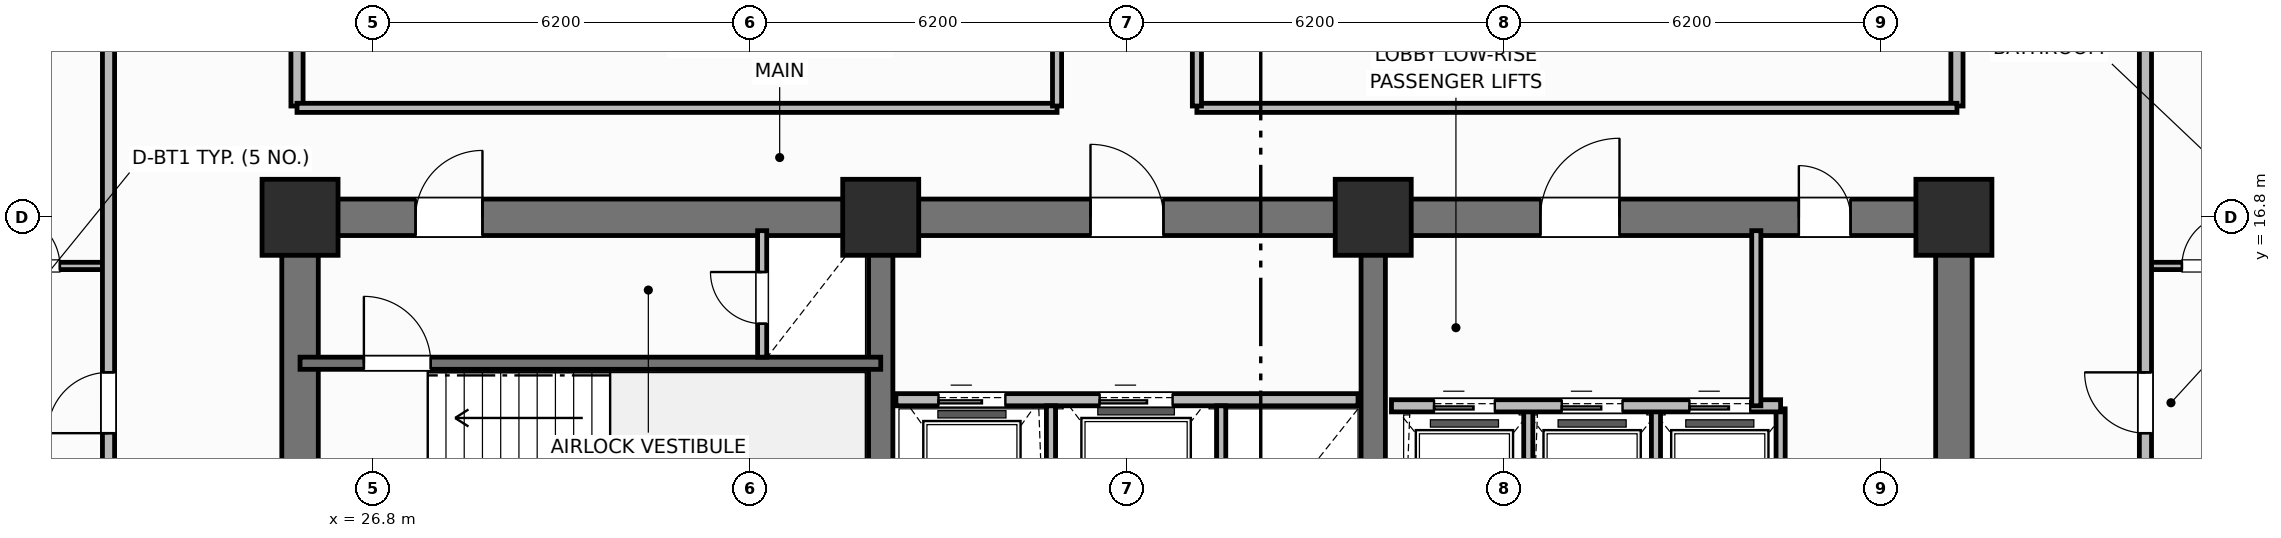
"""IFC4 building model, lengths in metres.
Left out: names, types, materials, properties, quantities, classifications, styles, units other than length and angle.
Written with IfcOpenShell. Run it as: python <this file> out.ifc"""

import sys

from ifc_helpers import new_model, si_unit, direction, frame, frame_2d, origin, origin_2d, place, context, subcontext, project, spatial, rectangle, extrude, element, fill, save


model = new_model("IFC4")
c1 = context("Model", 3, precision=1e-05, world=origin(), true_north=direction((0.0, 1.0)))
c2 = subcontext(c1, "Body", "Model", "MODEL_VIEW")
j1 = project(units=[si_unit("LENGTHUNIT", "METRE"), si_unit("PLANEANGLEUNIT", "RADIAN")], contexts=[c1])
p1 = place(None, origin())
s1 = spatial("IfcSite", under=j1, at=p1, CompositionType="ELEMENT")
p2 = place(p1, origin())
s2 = spatial("IfcBuilding", under=s1, at=p2, CompositionType="ELEMENT")
p3 = place(p2, frame((0.0, 0.0, 28.8)))
s3 = spatial("IfcBuildingStorey", under=s2, at=p3, CompositionType="ELEMENT", Elevation=28.8)
for number, where, z_axis, x_axis in (
    (1, (25.6, 10.9, 0.0), (0.0, 0.0, 1.0), (0.0, 1.0, 0.0)),
    (2, (52.8, 10.9, 0.0), (0.0, 0.0, 1.0), (0.0, 1.0, 0.0)),
):
    element("IfcWall", number, at=place(p3, frame(where, z_axis=z_axis, x_axis=x_axis)), inside=s3, PredefinedType="SHEAR", context=c2, shape_type="SweptSolid", body=[
        extrude(rectangle(XDim=5.6, YDim=0.6, at=frame_2d((2.8, 0.0))), origin(), (0.0, 0.0, 1.0), 3.7),
    ])
p4 = place(p3, frame((25.6, 16.8, 0.0), z_axis=(0.0, 0.0, 1.0), x_axis=(1.0, 0.0, 0.0)))
e3 = element("IfcWall", 3, at=p4, inside=s3, PredefinedType="SHEAR", context=c2, shape_type="SweptSolid", body=[
    extrude(rectangle(XDim=27.2, YDim=0.6, at=frame_2d((13.6, 0.0))), origin(), (0.0, 0.0, 1.0), 3.7),
])
p5 = place(p4, frame((1.9, 0.0, 0.0)))
e4 = element("IfcOpeningElement", 4, at=p5, cuts=e3, PredefinedType="OPENING", context=c2, shape_type="SweptSolid", body=[
    extrude(rectangle(XDim=1.1, YDim=2.15, at=frame_2d((0.55, 1.075))), frame((0.0, 0.31, 0.0), z_axis=(0.0, -1.0, 0.0), x_axis=(1.0, 0.0, 0.0)), (0.0, 0.0, 1.0), 0.62),
])
p6 = place(p4, frame((13.0, 0.0, 0.0)))
e5 = element("IfcOpeningElement", 5, at=p6, cuts=e3, PredefinedType="OPENING", context=c2, shape_type="SweptSolid", body=[
    extrude(rectangle(XDim=1.2, YDim=2.15, at=frame_2d((0.6, 1.075))), frame((0.0, 0.31, 0.0), z_axis=(0.0, -1.0, 0.0), x_axis=(1.0, 0.0, 0.0)), (0.0, 0.0, 1.0), 0.62),
])
p7 = place(p4, frame((20.4, 0.0, 0.0)))
e6 = element("IfcOpeningElement", 6, at=p7, cuts=e3, PredefinedType="OPENING", context=c2, shape_type="SweptSolid", body=[
    extrude(rectangle(XDim=1.3, YDim=2.2, at=frame_2d((0.65, 1.1))), frame((0.0, 0.31, 0.0), z_axis=(0.0, -1.0, 0.0), x_axis=(1.0, 0.0, 0.0)), (0.0, 0.0, 1.0), 0.62),
])
p8 = place(p4, frame((24.65, 0.0, 0.0)))
e7 = element("IfcOpeningElement", 7, at=p8, cuts=e3, PredefinedType="OPENING", context=c2, shape_type="SweptSolid", body=[
    extrude(rectangle(XDim=0.85, YDim=2.1, at=frame_2d((0.425, 1.05))), frame((0.0, 0.31, 0.0), z_axis=(0.0, -1.0, 0.0), x_axis=(1.0, 0.0, 0.0)), (0.0, 0.0, 1.0), 0.62),
])
for number, where, z_axis, x_axis in (
    (8, (35.15, 10.9, 0.0), (0.0, 0.0, 1.0), (0.0, 1.0, 0.0)),
    (9, (43.25, 10.9, 0.0), (0.0, 0.0, 1.0), (0.0, 1.0, 0.0)),
):
    element("IfcWall", number, at=place(p3, frame(where, z_axis=z_axis, x_axis=x_axis)), inside=s3, PredefinedType="SHEAR", context=c2, shape_type="SweptSolid", body=[
        extrude(rectangle(XDim=5.6, YDim=0.4, at=frame_2d((2.8, 0.0))), origin(), (0.0, 0.0, 1.0), 3.7),
    ])
for number, where, z_axis, x_axis in (
    (10, (25.6, 16.8, 0.0), (0.0, 0.0, 1.0), (1.0, 0.0, 0.0)),
    (11, (35.15, 16.8, 0.0), (0.0, 0.0, 1.0), (1.0, 0.0, 0.0)),
    (12, (43.25, 16.8, 0.0), (0.0, 0.0, 1.0), (1.0, 0.0, 0.0)),
    (13, (52.8, 16.8, 0.0), (0.0, 0.0, 1.0), (1.0, 0.0, 0.0)),
):
    element("IfcColumn", number, at=place(p3, frame(where, z_axis=z_axis, x_axis=x_axis)), inside=s3, PredefinedType="COLUMN", context=c2, shape_type="SweptSolid", body=[
        extrude(rectangle(XDim=1.25, YDim=1.25, at=origin_2d()), origin(), (0.0, 0.0, 1.0), 3.7),
    ])
p9 = place(p3, frame((25.6, 14.4, 0.0), z_axis=(0.0, 0.0, 1.0), x_axis=(1.0, 0.0, 0.0)))
e14 = element("IfcWall", 14, at=p9, inside=s3, PredefinedType="SHEAR", context=c2, shape_type="SweptSolid", body=[
    extrude(rectangle(XDim=9.55, YDim=0.2, at=frame_2d((4.775, 0.0))), origin(), (0.0, 0.0, 1.0), 3.7),
])
p10 = place(p9, frame((1.05, 0.0, 0.0)))
e15 = element("IfcOpeningElement", 15, at=p10, cuts=e14, PredefinedType="OPENING", context=c2, shape_type="SweptSolid", body=[
    extrude(rectangle(XDim=1.1, YDim=2.15, at=frame_2d((0.55, 1.075))), frame((0.0, 0.11, 0.0), z_axis=(0.0, -1.0, 0.0), x_axis=(1.0, 0.0, 0.0)), (0.0, 0.0, 1.0), 0.22),
])
p11 = place(p3, frame((33.2, 14.5, 0.0), z_axis=(0.0, 0.0, 1.0), x_axis=(0.0, 1.0, 0.0)))
e16 = element("IfcWall", 16, at=p11, inside=s3, PredefinedType="PARTITIONING", context=c2, shape_type="SweptSolid", body=[
    extrude(rectangle(XDim=2.08, YDim=0.15, at=frame_2d((1.04, 0.0))), origin(), (0.0, 0.0, 1.0), 2.53),
])
p12 = place(p11, frame((0.55, 0.0, 0.0)))
e17 = element("IfcOpeningElement", 17, at=p12, cuts=e16, PredefinedType="OPENING", context=c2, shape_type="SweptSolid", body=[
    extrude(rectangle(XDim=0.85, YDim=2.05, at=frame_2d((0.425, 1.025))), frame((0.0, 0.085, 0.0), z_axis=(0.0, -1.0, 0.0), x_axis=(1.0, 0.0, 0.0)), (0.0, 0.0, 1.0), 0.17),
])
p13 = place(p3, frame((35.4, 13.8, 0.0), z_axis=(0.0, 0.0, 1.0), x_axis=(1.0, 0.0, 0.0)))
e18 = element("IfcWall", 18, at=p13, inside=s3, PredefinedType="PARTITIONING", context=c2, shape_type="SweptSolid", body=[
    extrude(rectangle(XDim=7.6, YDim=0.2, at=frame_2d((3.8, 0.0))), origin(), (0.0, 0.0, 1.0), 2.3),
])
p14 = place(p13, frame((0.7, 0.0, 0.0)))
e19 = element("IfcOpeningElement", 19, at=p14, cuts=e18, PredefinedType="OPENING", context=c2, shape_type="SweptSolid", body=[
    extrude(rectangle(XDim=1.1, YDim=2.15, at=frame_2d((0.55, 1.075))), frame((0.0, 0.11, 0.0), z_axis=(0.0, -1.0, 0.0), x_axis=(1.0, 0.0, 0.0)), (0.0, 0.0, 1.0), 0.22),
])
p15 = place(p13, frame((3.35, 0.0, 0.0)))
e20 = element("IfcOpeningElement", 20, at=p15, cuts=e18, PredefinedType="OPENING", context=c2, shape_type="SweptSolid", body=[
    extrude(rectangle(XDim=1.2, YDim=2.15, at=frame_2d((0.6, 1.075))), frame((0.0, 0.11, 0.0), z_axis=(0.0, -1.0, 0.0), x_axis=(1.0, 0.0, 0.0)), (0.0, 0.0, 1.0), 0.22),
])
for number, where, z_axis, x_axis in (
    (21, (37.95, 10.95, 0.0), (0.0, 0.0, 1.0), (0.0, 1.0, 0.0)),
    (22, (40.75, 10.95, 0.0), (0.0, 0.0, 1.0), (0.0, 1.0, 0.0)),
):
    element("IfcWall", number, at=place(p3, frame(where, z_axis=z_axis, x_axis=x_axis)), inside=s3, PredefinedType="PARTITIONING", context=c2, shape_type="SweptSolid", body=[
        extrude(rectangle(XDim=2.75, YDim=0.15, at=frame_2d((1.375, 0.0))), origin(), (0.0, 0.0, 1.0), 2.53),
    ])
for number, where, z_axis, x_axis in (
    (23, (45.8, 10.95, 0.0), (0.0, 0.0, 1.0), (0.0, 1.0, 0.0)),
    (24, (47.9, 10.95, 0.0), (0.0, 0.0, 1.0), (0.0, 1.0, 0.0)),
    (25, (49.95, 10.95, 0.0), (0.0, 0.0, 1.0), (0.0, 1.0, 0.0)),
):
    element("IfcWall", number, at=place(p3, frame(where, z_axis=z_axis, x_axis=x_axis)), inside=s3, PredefinedType="PARTITIONING", context=c2, shape_type="SweptSolid", body=[
        extrude(rectangle(XDim=2.7, YDim=0.15, at=frame_2d((1.35, 0.0))), origin(), (0.0, 0.0, 1.0), 2.53),
    ])
p16 = place(p3, frame((43.55, 13.7, 0.0), z_axis=(0.0, 0.0, 1.0), x_axis=(1.0, 0.0, 0.0)))
e26 = element("IfcWall", 26, at=p16, inside=s3, PredefinedType="PARTITIONING", context=c2, shape_type="SweptSolid", body=[
    extrude(rectangle(XDim=6.4, YDim=0.2, at=frame_2d((3.2, 0.0))), origin(), (0.0, 0.0, 1.0), 2.53),
])
p17 = place(p16, frame((0.7, 0.0, 0.0)))
e27 = element("IfcOpeningElement", 27, at=p17, cuts=e26, PredefinedType="OPENING", context=c2, shape_type="SweptSolid", body=[
    extrude(rectangle(XDim=1.0, YDim=2.15, at=frame_2d((0.5, 1.075))), frame((0.0, 0.11, 0.0), z_axis=(0.0, -1.0, 0.0), x_axis=(1.0, 0.0, 0.0)), (0.0, 0.0, 1.0), 0.22),
])
p18 = place(p16, frame((2.8, 0.0, 0.0)))
e28 = element("IfcOpeningElement", 28, at=p18, cuts=e26, PredefinedType="OPENING", context=c2, shape_type="SweptSolid", body=[
    extrude(rectangle(XDim=1.0, YDim=2.15, at=frame_2d((0.5, 1.075))), frame((0.0, 0.11, 0.0), z_axis=(0.0, -1.0, 0.0), x_axis=(1.0, 0.0, 0.0)), (0.0, 0.0, 1.0), 0.22),
])
p19 = place(p16, frame((4.9, 0.0, 0.0)))
e29 = element("IfcOpeningElement", 29, at=p19, cuts=e26, PredefinedType="OPENING", context=c2, shape_type="SweptSolid", body=[
    extrude(rectangle(XDim=1.0, YDim=2.15, at=frame_2d((0.5, 1.075))), frame((0.0, 0.11, 0.0), z_axis=(0.0, -1.0, 0.0), x_axis=(1.0, 0.0, 0.0)), (0.0, 0.0, 1.0), 0.22),
])
p20 = place(p3, frame((49.55, 13.7, 0.0), z_axis=(0.0, 0.0, 1.0), x_axis=(0.0, 1.0, 0.0)))
e30 = element("IfcWall", 30, at=p20, inside=s3, PredefinedType="PARTITIONING", context=c2, shape_type="SweptSolid", body=[
    extrude(rectangle(XDim=2.88, YDim=0.15, at=frame_2d((1.44, 0.0))), origin(), (0.0, 0.0, 1.0), 2.53),
])
for number, where, z_axis, x_axis in (
    (31, (25.55, 18.63, 0.0), (0.0, 0.0, 1.0), (0.0, 1.0, 0.0)),
    (32, (52.85, 18.63, 0.0), (0.0, 0.0, 1.0), (0.0, 1.0, 0.0)),
):
    element("IfcWall", number, at=place(p3, frame(where, z_axis=z_axis, x_axis=x_axis)), inside=s3, PredefinedType="PARTITIONING", context=c2, shape_type="SweptSolid", body=[
        extrude(rectangle(XDim=19.14, YDim=0.2, at=frame_2d((9.57, 0.0))), origin(), (0.0, 0.0, 1.0), 2.53),
    ])
for number, where, z_axis, x_axis in (
    (33, (25.55, 18.6, 0.0), (0.0, 0.0, 1.0), (1.0, 0.0, 0.0)),
    (34, (40.35, 18.6, 0.0), (0.0, 0.0, 1.0), (1.0, 0.0, 0.0)),
):
    element("IfcWall", number, at=place(p3, frame(where, z_axis=z_axis, x_axis=x_axis)), inside=s3, PredefinedType="PARTITIONING", context=c2, shape_type="SweptSolid", body=[
        extrude(rectangle(XDim=12.5, YDim=0.15, at=frame_2d((6.25, 0.0))), origin(), (0.0, 0.0, 1.0), 2.53),
    ])
p21 = place(p3, frame((38.05, 18.63, 0.0), z_axis=(0.0, 0.0, 1.0), x_axis=(0.0, 1.0, 0.0)))
e35 = element("IfcWall", 35, at=p21, inside=s3, PredefinedType="PARTITIONING", context=c2, shape_type="SweptSolid", body=[
    extrude(rectangle(XDim=19.14, YDim=0.15, at=frame_2d((9.57, 0.0))), origin(), (0.0, 0.0, 1.0), 2.53),
])
p22 = place(p21, frame((5.5, 0.0, 0.0)))
e36 = element("IfcOpeningElement", 36, at=p22, cuts=e35, PredefinedType="OPENING", context=c2, shape_type="SweptSolid", body=[
    extrude(rectangle(XDim=1.0, YDim=2.15, at=frame_2d((0.5, 1.075))), frame((0.0, 0.085, 0.0), z_axis=(0.0, -1.0, 0.0), x_axis=(1.0, 0.0, 0.0)), (0.0, 0.0, 1.0), 0.17),
])
p23 = place(p3, frame((40.35, 18.63, 0.0), z_axis=(0.0, 0.0, 1.0), x_axis=(0.0, 1.0, 0.0)))
e37 = element("IfcWall", 37, at=p23, inside=s3, PredefinedType="PARTITIONING", context=c2, shape_type="SweptSolid", body=[
    extrude(rectangle(XDim=19.14, YDim=0.15, at=frame_2d((9.57, 0.0))), origin(), (0.0, 0.0, 1.0), 2.53),
])
p24 = place(p23, frame((5.5, 0.0, 0.0)))
e38 = element("IfcOpeningElement", 38, at=p24, cuts=e37, PredefinedType="OPENING", context=c2, shape_type="SweptSolid", body=[
    extrude(rectangle(XDim=1.0, YDim=2.15, at=frame_2d((0.5, 1.075))), frame((0.0, 0.085, 0.0), z_axis=(0.0, -1.0, 0.0), x_axis=(1.0, 0.0, 0.0)), (0.0, 0.0, 1.0), 0.17),
])
p25 = place(p3, frame((20.2, 16.0, 0.0), z_axis=(0.0, 0.0, 1.0), x_axis=(1.0, 0.0, 0.0)))
e39 = element("IfcWall", 39, at=p25, inside=s3, PredefinedType="PARTITIONING", context=c2, shape_type="SweptSolid", body=[
    extrude(rectangle(XDim=2.25, YDim=0.12, at=frame_2d((1.125, 0.0))), origin(), (0.0, 0.0, 1.0), 2.53),
])
p26 = place(p25, frame((0.6, 0.0, 0.0)))
e40 = element("IfcOpeningElement", 40, at=p26, cuts=e39, PredefinedType="OPENING", context=c2, shape_type="SweptSolid", body=[
    extrude(rectangle(XDim=0.85, YDim=2.1, at=frame_2d((0.425, 1.05))), frame((0.0, 0.07, 0.0), z_axis=(0.0, -1.0, 0.0), x_axis=(1.0, 0.0, 0.0)), (0.0, 0.0, 1.0), 0.14),
])
p27 = place(p3, frame((22.45, 10.6, 0.0), z_axis=(0.0, 0.0, 1.0), x_axis=(0.0, 1.0, 0.0)))
e41 = element("IfcWall", 41, at=p27, inside=s3, PredefinedType="PARTITIONING", context=c2, shape_type="SweptSolid", body=[
    extrude(rectangle(XDim=35.2, YDim=0.2, at=frame_2d((17.6, 0.0))), origin(), (0.0, 0.0, 1.0), 2.53),
])
p28 = place(p27, frame((2.65, 0.0, 0.0)))
e42 = element("IfcOpeningElement", 42, at=p28, cuts=e41, PredefinedType="OPENING", context=c2, shape_type="SweptSolid", body=[
    extrude(rectangle(XDim=1.0, YDim=2.15, at=frame_2d((0.5, 1.075))), frame((0.0, 0.11, 0.0), z_axis=(0.0, -1.0, 0.0), x_axis=(1.0, 0.0, 0.0)), (0.0, 0.0, 1.0), 0.22),
])
p29 = place(p27, frame((19.95, 0.0, 0.0)))
e43 = element("IfcOpeningElement", 43, at=p29, cuts=e41, PredefinedType="OPENING", context=c2, shape_type="SweptSolid", body=[
    extrude(rectangle(XDim=1.0, YDim=2.15, at=frame_2d((0.5, 1.075))), frame((0.0, 0.11, 0.0), z_axis=(0.0, -1.0, 0.0), x_axis=(1.0, 0.0, 0.0)), (0.0, 0.0, 1.0), 0.22),
])
p30 = place(p3, frame((55.95, 16.0, 0.0), z_axis=(0.0, 0.0, 1.0), x_axis=(1.0, 0.0, 0.0)))
e44 = element("IfcWall", 44, at=p30, inside=s3, PredefinedType="PARTITIONING", context=c2, shape_type="SweptSolid", body=[
    extrude(rectangle(XDim=2.25, YDim=0.12, at=frame_2d((1.125, 0.0))), origin(), (0.0, 0.0, 1.0), 2.53),
])
p31 = place(p30, frame((0.6, 0.0, 0.0)))
e45 = element("IfcOpeningElement", 45, at=p31, cuts=e44, PredefinedType="OPENING", context=c2, shape_type="SweptSolid", body=[
    extrude(rectangle(XDim=0.85, YDim=2.1, at=frame_2d((0.425, 1.05))), frame((0.0, 0.07, 0.0), z_axis=(0.0, -1.0, 0.0), x_axis=(1.0, 0.0, 0.0)), (0.0, 0.0, 1.0), 0.14),
])
p32 = place(p3, frame((55.95, 10.6, 0.0), z_axis=(0.0, 0.0, 1.0), x_axis=(0.0, 1.0, 0.0)))
e46 = element("IfcWall", 46, at=p32, inside=s3, PredefinedType="PARTITIONING", context=c2, shape_type="SweptSolid", body=[
    extrude(rectangle(XDim=35.2, YDim=0.2, at=frame_2d((17.6, 0.0))), origin(), (0.0, 0.0, 1.0), 2.53),
])
p33 = place(p32, frame((2.65, 0.0, 0.0)))
e47 = element("IfcOpeningElement", 47, at=p33, cuts=e46, PredefinedType="OPENING", context=c2, shape_type="SweptSolid", body=[
    extrude(rectangle(XDim=1.0, YDim=2.15, at=frame_2d((0.5, 1.075))), frame((0.0, 0.11, 0.0), z_axis=(0.0, -1.0, 0.0), x_axis=(1.0, 0.0, 0.0)), (0.0, 0.0, 1.0), 0.22),
])
p34 = place(p32, frame((12.518, 0.0, 0.0)))
e48 = element("IfcOpeningElement", 48, at=p34, cuts=e46, PredefinedType="OPENING", context=c2, shape_type="SweptSolid", body=[
    extrude(rectangle(XDim=1.0, YDim=2.15, at=frame_2d((0.5, 1.075))), frame((0.0, 0.11, 0.0), z_axis=(0.0, -1.0, 0.0), x_axis=(1.0, 0.0, 0.0)), (0.0, 0.0, 1.0), 0.22),
])
p35 = place(p32, frame((23.65, 0.0, 0.0)))
e49 = element("IfcOpeningElement", 49, at=p35, cuts=e46, PredefinedType="OPENING", context=c2, shape_type="SweptSolid", body=[
    extrude(rectangle(XDim=1.0, YDim=2.15, at=frame_2d((0.5, 1.075))), frame((0.0, 0.11, 0.0), z_axis=(0.0, -1.0, 0.0), x_axis=(1.0, 0.0, 0.0)), (0.0, 0.0, 1.0), 0.22),
])
p36 = place(p10, origin())
e50 = element("IfcDoor", 50, at=p36, inside=s3, OperationType="SINGLE_SWING_LEFT", PredefinedType="DOOR", context=c2, shape_type="SweptSolid", body=[
    extrude(rectangle(XDim=1.1, YDim=2.15, at=frame_2d((0.55, 1.075))), frame((0.0, 0.025, 0.0), z_axis=(0.0, -1.0, 0.0), x_axis=(1.0, 0.0, 0.0)), (0.0, 0.0, 1.0), 0.05),
])
fill(e15, e50)
p37 = place(p12, origin())
e51 = element("IfcDoor", 51, at=p37, inside=s3, OperationType="SINGLE_SWING_RIGHT", PredefinedType="TRAPDOOR", context=c2, shape_type="SweptSolid", body=[
    extrude(rectangle(XDim=0.85, YDim=2.05, at=frame_2d((0.425, 1.025))), frame((0.0, 0.025, 0.0), z_axis=(0.0, -1.0, 0.0), x_axis=(1.0, 0.0, 0.0)), (0.0, 0.0, 1.0), 0.05),
])
fill(e17, e51)
p38 = place(p14, origin())
e52 = element("IfcDoor", 52, at=p38, inside=s3, OperationType="SLIDING_TO_LEFT", PredefinedType="DOOR", context=c2, shape_type="SweptSolid", body=[
    extrude(rectangle(XDim=1.1, YDim=2.15, at=frame_2d((0.55, 1.075))), frame((0.0, 0.025, 0.0), z_axis=(0.0, -1.0, 0.0), x_axis=(1.0, 0.0, 0.0)), (0.0, 0.0, 1.0), 0.05),
])
fill(e19, e52)
p39 = place(p15, origin())
e53 = element("IfcDoor", 53, at=p39, inside=s3, OperationType="SLIDING_TO_LEFT", PredefinedType="DOOR", context=c2, shape_type="SweptSolid", body=[
    extrude(rectangle(XDim=1.2, YDim=2.15, at=frame_2d((0.6, 1.075))), frame((0.0, 0.025, 0.0), z_axis=(0.0, -1.0, 0.0), x_axis=(1.0, 0.0, 0.0)), (0.0, 0.0, 1.0), 0.05),
])
fill(e20, e53)
p40 = place(p17, origin())
e54 = element("IfcDoor", 54, at=p40, inside=s3, OperationType="SLIDING_TO_LEFT", PredefinedType="DOOR", context=c2, shape_type="SweptSolid", body=[
    extrude(rectangle(XDim=1.0, YDim=2.15, at=frame_2d((0.5, 1.075))), frame((0.0, 0.025, 0.0), z_axis=(0.0, -1.0, 0.0), x_axis=(1.0, 0.0, 0.0)), (0.0, 0.0, 1.0), 0.05),
])
fill(e27, e54)
p41 = place(p18, origin())
e55 = element("IfcDoor", 55, at=p41, inside=s3, OperationType="SLIDING_TO_LEFT", PredefinedType="DOOR", context=c2, shape_type="SweptSolid", body=[
    extrude(rectangle(XDim=1.0, YDim=2.15, at=frame_2d((0.5, 1.075))), frame((0.0, 0.025, 0.0), z_axis=(0.0, -1.0, 0.0), x_axis=(1.0, 0.0, 0.0)), (0.0, 0.0, 1.0), 0.05),
])
fill(e28, e55)
p42 = place(p19, origin())
e56 = element("IfcDoor", 56, at=p42, inside=s3, OperationType="SLIDING_TO_LEFT", PredefinedType="DOOR", context=c2, shape_type="SweptSolid", body=[
    extrude(rectangle(XDim=1.0, YDim=2.15, at=frame_2d((0.5, 1.075))), frame((0.0, 0.025, 0.0), z_axis=(0.0, -1.0, 0.0), x_axis=(1.0, 0.0, 0.0)), (0.0, 0.0, 1.0), 0.05),
])
fill(e29, e56)
p43 = place(p26, origin())
e57 = element("IfcDoor", 57, at=p43, inside=s3, OperationType="SINGLE_SWING_LEFT", PredefinedType="DOOR", context=c2, shape_type="SweptSolid", body=[
    extrude(rectangle(XDim=0.85, YDim=2.1, at=frame_2d((0.425, 1.05))), frame((0.0, 0.025, 0.0), z_axis=(0.0, -1.0, 0.0), x_axis=(1.0, 0.0, 0.0)), (0.0, 0.0, 1.0), 0.05),
])
fill(e40, e57)
p44 = place(p28, origin())
e58 = element("IfcDoor", 58, at=p44, inside=s3, OperationType="SINGLE_SWING_LEFT", PredefinedType="DOOR", context=c2, shape_type="SweptSolid", body=[
    extrude(rectangle(XDim=1.0, YDim=2.15, at=frame_2d((0.5, 1.075))), frame((0.0, 0.025, 0.0), z_axis=(0.0, -1.0, 0.0), x_axis=(1.0, 0.0, 0.0)), (0.0, 0.0, 1.0), 0.05),
])
fill(e42, e58)
p45 = place(p31, origin())
e59 = element("IfcDoor", 59, at=p45, inside=s3, OperationType="SINGLE_SWING_RIGHT", PredefinedType="DOOR", context=c2, shape_type="SweptSolid", body=[
    extrude(rectangle(XDim=0.85, YDim=2.1, at=frame_2d((0.425, 1.05))), frame((0.0, 0.025, 0.0), z_axis=(0.0, -1.0, 0.0), x_axis=(1.0, 0.0, 0.0)), (0.0, 0.0, 1.0), 0.05),
])
fill(e45, e59)
p46 = place(p33, origin())
e60 = element("IfcDoor", 60, at=p46, inside=s3, OperationType="SINGLE_SWING_RIGHT", PredefinedType="DOOR", context=c2, shape_type="SweptSolid", body=[
    extrude(rectangle(XDim=1.0, YDim=2.15, at=frame_2d((0.5, 1.075))), frame((0.0, 0.025, 0.0), z_axis=(0.0, -1.0, 0.0), x_axis=(1.0, 0.0, 0.0)), (0.0, 0.0, 1.0), 0.05),
])
fill(e47, e60)
p47 = place(p5, origin())
e61 = element("IfcDoor", 61, at=p47, inside=s3, OperationType="SINGLE_SWING_RIGHT", PredefinedType="DOOR", context=c2, shape_type="SweptSolid", body=[
    extrude(rectangle(XDim=1.1, YDim=2.15, at=frame_2d((0.55, 1.075))), frame((0.0, 0.025, 0.0), z_axis=(0.0, -1.0, 0.0), x_axis=(1.0, 0.0, 0.0)), (0.0, 0.0, 1.0), 0.05),
])
fill(e4, e61)
p48 = place(p6, origin())
e62 = element("IfcDoor", 62, at=p48, inside=s3, OperationType="SINGLE_SWING_LEFT", PredefinedType="DOOR", context=c2, shape_type="SweptSolid", body=[
    extrude(rectangle(XDim=1.2, YDim=2.15, at=frame_2d((0.6, 1.075))), frame((0.0, 0.025, 0.0), z_axis=(0.0, -1.0, 0.0), x_axis=(1.0, 0.0, 0.0)), (0.0, 0.0, 1.0), 0.05),
])
fill(e5, e62)
p49 = place(p7, origin())
e63 = element("IfcDoor", 63, at=p49, inside=s3, OperationType="SINGLE_SWING_RIGHT", PredefinedType="DOOR", context=c2, shape_type="SweptSolid", body=[
    extrude(rectangle(XDim=1.3, YDim=2.2, at=frame_2d((0.65, 1.1))), frame((0.0, 0.025, 0.0), z_axis=(0.0, -1.0, 0.0), x_axis=(1.0, 0.0, 0.0)), (0.0, 0.0, 1.0), 0.05),
])
fill(e6, e63)
p50 = place(p8, origin())
e64 = element("IfcDoor", 64, at=p50, inside=s3, OperationType="SINGLE_SWING_LEFT", PredefinedType="DOOR", context=c2, shape_type="SweptSolid", body=[
    extrude(rectangle(XDim=0.85, YDim=2.1, at=frame_2d((0.425, 1.05))), frame((0.0, 0.025, 0.0), z_axis=(0.0, -1.0, 0.0), x_axis=(1.0, 0.0, 0.0)), (0.0, 0.0, 1.0), 0.05),
])
fill(e7, e64)
save(model, sys.argv[1])
